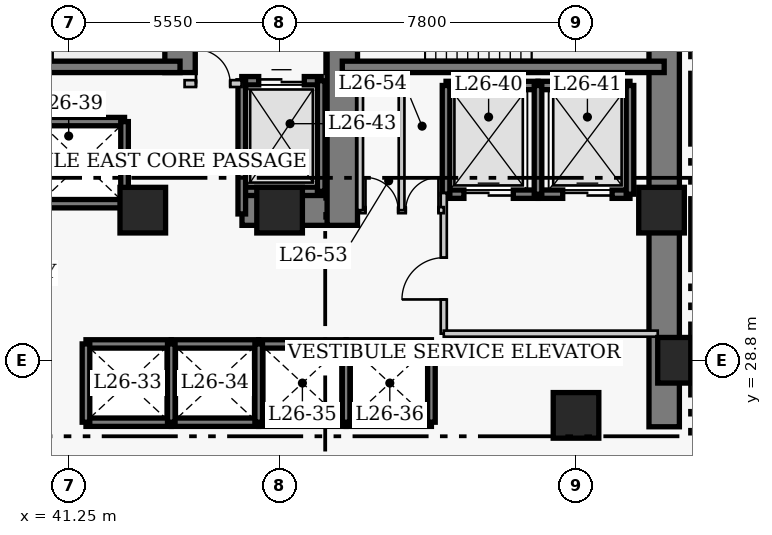
"""IFC4 building model, lengths in metres.
Left out: names, types, materials, properties, quantities, classifications, styles, units other than length and angle.
Written with IfcOpenShell. Run it as: python <this file> out.ifc"""

import sys

from ifc_helpers import new_model, si_unit, direction, frame, frame_2d, origin, origin_2d, place, context, subcontext, project, spatial, rectangle, extrude, element, fill, save


model = new_model("IFC4")
c1 = context("Model", 3, precision=1e-05, world=origin(), true_north=direction((0.0, 1.0)))
c2 = subcontext(c1, "Body", "Model", "MODEL_VIEW")
j1 = project(units=[si_unit("LENGTHUNIT", "METRE"), si_unit("PLANEANGLEUNIT", "RADIAN")], contexts=[c1])
p1 = place(None, origin())
s1 = spatial("IfcSite", under=j1, at=p1, CompositionType="ELEMENT")
p2 = place(p1, origin())
s2 = spatial("IfcBuilding", under=s1, at=p2, CompositionType="ELEMENT")
p3 = place(p2, frame((0.0, 0.0, 107.0)))
s3 = spatial("IfcBuildingStorey", under=s2, at=p3, CompositionType="ELEMENT", Elevation=107.0)
p4 = place(p3, frame((56.92, 27.05, 0.0), z_axis=(0.0, 0.0, 1.0), x_axis=(0.0, 1.0, 0.0)))
e1 = element("IfcWall", 1, at=p4, inside=s3, PredefinedType="SHEAR", context=c2, shape_type="SweptSolid", body=[
    extrude(rectangle(XDim=13.67, YDim=0.8, at=frame_2d((6.835, 0.0))), origin(), (0.0, 0.0, 1.0), 3.8),
])
p5 = place(p3, frame((45.81, 32.75, 0.0), z_axis=(0.0, 0.0, 1.0), x_axis=(1.0, 0.0, 0.0)))
e2 = element("IfcWall", 2, at=p5, inside=s3, PredefinedType="SHEAR", context=c2, shape_type="SweptSolid", body=[
    extrude(rectangle(XDim=2.64, YDim=0.8, at=frame_2d((1.32, 0.0))), origin(), (0.0, 0.0, 1.0), 3.8),
])
p6 = place(p3, frame((44.18, 36.37, 0.0), z_axis=(0.0, 0.0, 1.0), x_axis=(0.0, 1.0, 0.0)))
e3 = element("IfcWall", 3, at=p6, inside=s3, PredefinedType="SHEAR", context=c2, shape_type="SweptSolid", body=[
    extrude(rectangle(XDim=3.95, YDim=0.8, at=frame_2d((1.975, 0.0))), origin(), (0.0, 0.0, 1.0), 3.8),
])
p7 = place(p3, frame((48.45, 32.35, 0.0), z_axis=(0.0, 0.0, 1.0), x_axis=(0.0, 1.0, 0.0)))
e4 = element("IfcWall", 4, at=p7, inside=s3, PredefinedType="SHEAR", context=c2, shape_type="SweptSolid", body=[
    extrude(rectangle(XDim=7.97, YDim=0.8, at=frame_2d((3.985, 0.0))), origin(), (0.0, 0.0, 1.0), 3.8),
])
p8 = place(p7, frame((5.85, 0.0, 0.0)))
e5 = element("IfcOpeningElement", 5, at=p8, cuts=e4, PredefinedType="OPENING", context=c2, shape_type="SweptSolid", body=[
    extrude(rectangle(XDim=1.1, YDim=2.15, at=frame_2d((0.55, 1.075))), frame((0.0, 0.41, 0.0), z_axis=(0.0, -1.0, 0.0), x_axis=(1.0, 0.0, 0.0)), (0.0, 0.0, 1.0), 0.82),
])
p9 = place(p3, frame((35.85, 36.52, 0.0), z_axis=(0.0, 0.0, 1.0), x_axis=(1.0, 0.0, 0.0)))
e6 = element("IfcWall", 6, at=p9, inside=s3, PredefinedType="SHEAR", context=c2, shape_type="SweptSolid", body=[
    extrude(rectangle(XDim=8.33, YDim=0.3, at=frame_2d((4.165, 0.0))), origin(), (0.0, 0.0, 1.0), 3.8),
])
p10 = place(p3, frame((48.45, 36.52, 0.0), z_axis=(0.0, 0.0, 1.0), x_axis=(1.0, 0.0, 0.0)))
e7 = element("IfcWall", 7, at=p10, inside=s3, PredefinedType="SHEAR", context=c2, shape_type="SweptSolid", body=[
    extrude(rectangle(XDim=8.47, YDim=0.3, at=frame_2d((4.235, 0.0))), origin(), (0.0, 0.0, 1.0), 3.8),
])
for number, where, z_axis, x_axis in (
    (8, (57.35, 28.8, 0.0), (0.0, 0.0, 1.0), (1.0, 0.0, 0.0)),
    (9, (43.2, 32.75, 0.0), (0.0, 0.0, 1.0), (1.0, 0.0, 0.0)),
    (10, (46.8, 32.75, 0.0), (0.0, 0.0, 1.0), (1.0, 0.0, 0.0)),
    (11, (54.6, 27.35, 0.0), (0.0, 0.0, 1.0), (1.0, 0.0, 0.0)),
    (12, (56.85, 32.75, 0.0), (0.0, 0.0, 1.0), (1.0, 0.0, 0.0)),
):
    element("IfcColumn", number, at=place(p3, frame(where, z_axis=z_axis, x_axis=x_axis)), inside=s3, PredefinedType="COLUMN", context=c2, shape_type="SweptSolid", body=[
        extrude(rectangle(XDim=1.2, YDim=1.2, at=origin_2d()), origin(), (0.0, 0.0, 1.0), 3.8),
    ])
for number, where, z_axis, x_axis in (
    (13, (41.705, 29.23, 0.0), (0.0, 0.0, 1.0), (1.0, 0.0, 0.0)),
    (14, (41.705, 27.17, 0.0), (0.0, 0.0, 1.0), (1.0, 0.0, 0.0)),
):
    element("IfcWall", number, at=place(p3, frame(where, z_axis=z_axis, x_axis=x_axis)), inside=s3, PredefinedType="SHEAR", context=c2, shape_type="SweptSolid", body=[
        extrude(rectangle(XDim=2.245, YDim=0.22, at=frame_2d((1.123, 0.0))), origin(), (0.0, 0.0, 1.0), 3.8),
    ])
p11 = place(p3, frame((41.705, 27.17, 0.0), z_axis=(0.0, 0.0, 1.0), x_axis=(0.0, 1.0, 0.0)))
e15 = element("IfcWall", 15, at=p11, inside=s3, PredefinedType="SHEAR", context=c2, shape_type="SweptSolid", body=[
    extrude(rectangle(XDim=2.06, YDim=0.2, at=frame_2d((1.03, 0.0))), origin(), (0.0, 0.0, 1.0), 3.8),
])
for number, where, z_axis, x_axis in (
    (16, (43.95, 29.23, 0.0), (0.0, 0.0, 1.0), (1.0, 0.0, 0.0)),
    (17, (43.95, 27.17, 0.0), (0.0, 0.0, 1.0), (1.0, 0.0, 0.0)),
):
    element("IfcWall", number, at=place(p3, frame(where, z_axis=z_axis, x_axis=x_axis)), inside=s3, PredefinedType="SHEAR", context=c2, shape_type="SweptSolid", body=[
        extrude(rectangle(XDim=2.3, YDim=0.22, at=frame_2d((1.15, 0.0))), origin(), (0.0, 0.0, 1.0), 3.8),
    ])
p12 = place(p3, frame((43.95, 27.17, 0.0), z_axis=(0.0, 0.0, 1.0), x_axis=(0.0, 1.0, 0.0)))
e18 = element("IfcWall", 18, at=p12, inside=s3, PredefinedType="SHEAR", context=c2, shape_type="SweptSolid", body=[
    extrude(rectangle(XDim=2.06, YDim=0.2, at=frame_2d((1.03, 0.0))), origin(), (0.0, 0.0, 1.0), 3.8),
])
for number, where, z_axis, x_axis in (
    (19, (46.25, 29.23, 0.0), (0.0, 0.0, 1.0), (1.0, 0.0, 0.0)),
    (20, (46.25, 27.17, 0.0), (0.0, 0.0, 1.0), (1.0, 0.0, 0.0)),
):
    element("IfcWall", number, at=place(p3, frame(where, z_axis=z_axis, x_axis=x_axis)), inside=s3, PredefinedType="SHEAR", context=c2, shape_type="SweptSolid", body=[
        extrude(rectangle(XDim=2.3, YDim=0.22, at=frame_2d((1.15, 0.0))), origin(), (0.0, 0.0, 1.0), 3.8),
    ])
p13 = place(p3, frame((46.25, 27.17, 0.0), z_axis=(0.0, 0.0, 1.0), x_axis=(0.0, 1.0, 0.0)))
e21 = element("IfcWall", 21, at=p13, inside=s3, PredefinedType="SHEAR", context=c2, shape_type="SweptSolid", body=[
    extrude(rectangle(XDim=2.06, YDim=0.2, at=frame_2d((1.03, 0.0))), origin(), (0.0, 0.0, 1.0), 3.8),
])
for number, where, z_axis, x_axis in (
    (22, (48.55, 29.23, 0.0), (0.0, 0.0, 1.0), (1.0, 0.0, 0.0)),
    (23, (48.55, 27.17, 0.0), (0.0, 0.0, 1.0), (1.0, 0.0, 0.0)),
):
    element("IfcWall", number, at=place(p3, frame(where, z_axis=z_axis, x_axis=x_axis)), inside=s3, PredefinedType="SHEAR", context=c2, shape_type="SweptSolid", body=[
        extrude(rectangle(XDim=2.245, YDim=0.22, at=frame_2d((1.123, 0.0))), origin(), (0.0, 0.0, 1.0), 3.8),
    ])
for number, where, z_axis, x_axis in (
    (24, (48.55, 27.17, 0.0), (0.0, 0.0, 1.0), (0.0, 1.0, 0.0)),
    (25, (50.795, 27.17, 0.0), (0.0, 0.0, 1.0), (0.0, 1.0, 0.0)),
):
    element("IfcWall", number, at=place(p3, frame(where, z_axis=z_axis, x_axis=x_axis)), inside=s3, PredefinedType="SHEAR", context=c2, shape_type="SweptSolid", body=[
        extrude(rectangle(XDim=2.06, YDim=0.2, at=frame_2d((1.03, 0.0))), origin(), (0.0, 0.0, 1.0), 3.8),
    ])
for number, where, z_axis, x_axis in (
    (26, (40.4, 35.08, 0.0), (0.0, 0.0, 1.0), (1.0, 0.0, 0.0)),
    (27, (40.4, 32.92, 0.0), (0.0, 0.0, 1.0), (1.0, 0.0, 0.0)),
):
    element("IfcWall", number, at=place(p3, frame(where, z_axis=z_axis, x_axis=x_axis)), inside=s3, PredefinedType="SHEAR", context=c2, shape_type="SweptSolid", body=[
        extrude(rectangle(XDim=2.32, YDim=0.22, at=frame_2d((1.16, 0.0))), origin(), (0.0, 0.0, 1.0), 3.8),
    ])
p14 = place(p3, frame((42.72, 32.92, 0.0), z_axis=(0.0, 0.0, 1.0), x_axis=(0.0, 1.0, 0.0)))
e28 = element("IfcWall", 28, at=p14, inside=s3, PredefinedType="SHEAR", context=c2, shape_type="SweptSolid", body=[
    extrude(rectangle(XDim=2.16, YDim=0.2, at=frame_2d((1.08, 0.0))), origin(), (0.0, 0.0, 1.0), 3.8),
])
p15 = place(p3, frame((51.18, 36.03, 0.0), z_axis=(0.0, 0.0, 1.0), x_axis=(1.0, 0.0, 0.0)))
e29 = element("IfcWall", 29, at=p15, inside=s3, PredefinedType="SHEAR", context=c2, shape_type="SweptSolid", body=[
    extrude(rectangle(XDim=2.42, YDim=0.22, at=frame_2d((1.21, 0.0))), origin(), (0.0, 0.0, 1.0), 3.8),
])
p16 = place(p3, frame((51.18, 33.17, 0.0), z_axis=(0.0, 0.0, 1.0), x_axis=(1.0, 0.0, 0.0)))
e30 = element("IfcWall", 30, at=p16, inside=s3, PredefinedType="SHEAR", context=c2, shape_type="SweptSolid", body=[
    extrude(rectangle(XDim=2.42, YDim=0.22, at=frame_2d((1.21, 0.0))), origin(), (0.0, 0.0, 1.0), 3.8),
])
p17 = place(p16, frame((0.47, 0.0, 0.0)))
e31 = element("IfcOpeningElement", 31, at=p17, cuts=e30, PredefinedType="OPENING", context=c2, shape_type="SweptSolid", body=[
    extrude(rectangle(XDim=1.3, YDim=2.15, at=frame_2d((0.65, 1.075))), frame((0.0, 0.12, 0.0), z_axis=(0.0, -1.0, 0.0), x_axis=(1.0, 0.0, 0.0)), (0.0, 0.0, 1.0), 0.24),
])
p18 = place(p3, frame((51.18, 33.17, 0.0), z_axis=(0.0, 0.0, 1.0), x_axis=(0.0, 1.0, 0.0)))
e32 = element("IfcWall", 32, at=p18, inside=s3, PredefinedType="SHEAR", context=c2, shape_type="SweptSolid", body=[
    extrude(rectangle(XDim=2.86, YDim=0.2, at=frame_2d((1.43, 0.0))), origin(), (0.0, 0.0, 1.0), 3.8),
])
p19 = place(p3, frame((53.6, 36.03, 0.0), z_axis=(0.0, 0.0, 1.0), x_axis=(1.0, 0.0, 0.0)))
e33 = element("IfcWall", 33, at=p19, inside=s3, PredefinedType="SHEAR", context=c2, shape_type="SweptSolid", body=[
    extrude(rectangle(XDim=2.42, YDim=0.22, at=frame_2d((1.21, 0.0))), origin(), (0.0, 0.0, 1.0), 3.8),
])
p20 = place(p3, frame((53.6, 33.17, 0.0), z_axis=(0.0, 0.0, 1.0), x_axis=(1.0, 0.0, 0.0)))
e34 = element("IfcWall", 34, at=p20, inside=s3, PredefinedType="SHEAR", context=c2, shape_type="SweptSolid", body=[
    extrude(rectangle(XDim=2.42, YDim=0.22, at=frame_2d((1.21, 0.0))), origin(), (0.0, 0.0, 1.0), 3.8),
])
p21 = place(p20, frame((0.65, 0.0, 0.0)))
e35 = element("IfcOpeningElement", 35, at=p21, cuts=e34, PredefinedType="OPENING", context=c2, shape_type="SweptSolid", body=[
    extrude(rectangle(XDim=1.3, YDim=2.15, at=frame_2d((0.65, 1.075))), frame((0.0, 0.12, 0.0), z_axis=(0.0, -1.0, 0.0), x_axis=(1.0, 0.0, 0.0)), (0.0, 0.0, 1.0), 0.24),
])
for number, where, z_axis, x_axis in (
    (36, (53.6, 33.17, 0.0), (0.0, 0.0, 1.0), (0.0, 1.0, 0.0)),
    (37, (56.02, 33.17, 0.0), (0.0, 0.0, 1.0), (0.0, 1.0, 0.0)),
):
    element("IfcWall", number, at=place(p3, frame(where, z_axis=z_axis, x_axis=x_axis)), inside=s3, PredefinedType="SHEAR", context=c2, shape_type="SweptSolid", body=[
        extrude(rectangle(XDim=2.86, YDim=0.2, at=frame_2d((1.43, 0.0))), origin(), (0.0, 0.0, 1.0), 3.8),
    ])
p22 = place(p3, frame((45.805, 36.155, 0.0), z_axis=(0.0, 0.0, 1.0), x_axis=(1.0, 0.0, 0.0)))
e38 = element("IfcWall", 38, at=p22, inside=s3, PredefinedType="SHEAR", context=c2, shape_type="SweptSolid", body=[
    extrude(rectangle(XDim=2.09, YDim=0.22, at=frame_2d((1.045, 0.0))), origin(), (0.0, 0.0, 1.0), 3.8),
])
p23 = place(p22, frame((0.445, 0.0, 0.0)))
e39 = element("IfcOpeningElement", 39, at=p23, cuts=e38, PredefinedType="OPENING", context=c2, shape_type="SweptSolid", body=[
    extrude(rectangle(XDim=1.2, YDim=2.15, at=frame_2d((0.6, 1.075))), frame((0.0, 0.12, 0.0), z_axis=(0.0, -1.0, 0.0), x_axis=(1.0, 0.0, 0.0)), (0.0, 0.0, 1.0), 0.24),
])
p24 = place(p3, frame((45.805, 33.245, 0.0), z_axis=(0.0, 0.0, 1.0), x_axis=(1.0, 0.0, 0.0)))
e40 = element("IfcWall", 40, at=p24, inside=s3, PredefinedType="SHEAR", context=c2, shape_type="SweptSolid", body=[
    extrude(rectangle(XDim=2.09, YDim=0.22, at=frame_2d((1.045, 0.0))), origin(), (0.0, 0.0, 1.0), 3.8),
])
p25 = place(p3, frame((45.805, 32.65, 0.0), z_axis=(0.0, 0.0, 1.0), x_axis=(0.0, 1.0, 0.0)))
e41 = element("IfcWall", 41, at=p25, inside=s3, PredefinedType="SHEAR", context=c2, shape_type="SweptSolid", body=[
    extrude(rectangle(XDim=3.505, YDim=0.2, at=frame_2d((1.752, 0.0))), origin(), (0.0, 0.0, 1.0), 3.8),
])
p26 = place(p3, frame((47.895, 33.245, 0.0), z_axis=(0.0, 0.0, 1.0), x_axis=(0.0, 1.0, 0.0)))
e42 = element("IfcWall", 42, at=p26, inside=s3, PredefinedType="SHEAR", context=c2, shape_type="SweptSolid", body=[
    extrude(rectangle(XDim=2.91, YDim=0.2, at=frame_2d((1.455, 0.0))), origin(), (0.0, 0.0, 1.0), 3.8),
])
p27 = place(p3, frame((44.3, 36.08, 0.0), z_axis=(0.0, 0.0, 1.0), x_axis=(1.0, 0.0, 0.0)))
e43 = element("IfcWall", 43, at=p27, inside=s3, PredefinedType="PARTITIONING", context=c2, shape_type="SweptSolid", body=[
    extrude(rectangle(XDim=1.5, YDim=0.18, at=frame_2d((0.75, 0.0))), origin(), (0.0, 0.0, 1.0), 3.54),
])
p28 = place(p27, frame((0.3, 0.0, 0.0)))
e44 = element("IfcOpeningElement", 44, at=p28, cuts=e43, PredefinedType="OPENING", context=c2, shape_type="SweptSolid", body=[
    extrude(rectangle(XDim=0.9, YDim=2.15, at=frame_2d((0.45, 1.075))), frame((0.0, 0.1, 0.0), z_axis=(0.0, -1.0, 0.0), x_axis=(1.0, 0.0, 0.0)), (0.0, 0.0, 1.0), 0.2),
])
p29 = place(p3, frame((51.12, 29.5, 0.0), z_axis=(0.0, 0.0, 1.0), x_axis=(0.0, 1.0, 0.0)))
e45 = element("IfcWall", 45, at=p29, inside=s3, PredefinedType="PARTITIONING", context=c2, shape_type="SweptSolid", body=[
    extrude(rectangle(XDim=3.7, YDim=0.16, at=frame_2d((1.85, 0.0))), origin(), (0.0, 0.0, 1.0), 3.54),
])
p30 = place(p29, frame((0.9, 0.0, 0.0)))
e46 = element("IfcOpeningElement", 46, at=p30, cuts=e45, PredefinedType="OPENING", context=c2, shape_type="SweptSolid", body=[
    extrude(rectangle(XDim=1.1, YDim=2.15, at=frame_2d((0.55, 1.075))), frame((0.0, 0.09, 0.0), z_axis=(0.0, -1.0, 0.0), x_axis=(1.0, 0.0, 0.0)), (0.0, 0.0, 1.0), 0.18),
])
p31 = place(p3, frame((51.12, 29.5, 0.0), z_axis=(0.0, 0.0, 1.0), x_axis=(1.0, 0.0, 0.0)))
e47 = element("IfcWall", 47, at=p31, inside=s3, PredefinedType="PARTITIONING", context=c2, shape_type="SweptSolid", body=[
    extrude(rectangle(XDim=5.63, YDim=0.16, at=frame_2d((2.815, 0.0))), origin(), (0.0, 0.0, 1.0), 3.54),
])
p32 = place(p3, frame((48.92, 32.75, 0.0), z_axis=(0.0, 0.0, 1.0), x_axis=(1.0, 0.0, 0.0)))
e48 = element("IfcWall", 48, at=p32, inside=s3, PredefinedType="PARTITIONING", context=c2, shape_type="SweptSolid", body=[
    extrude(rectangle(XDim=2.2, YDim=0.16, at=frame_2d((1.1, 0.0))), origin(), (0.0, 0.0, 1.0), 3.54),
])
p33 = place(p32, frame((0.14, 0.0, 0.0)))
e49 = element("IfcOpeningElement", 49, at=p33, cuts=e48, PredefinedType="OPENING", context=c2, shape_type="SweptSolid", body=[
    extrude(rectangle(XDim=0.86, YDim=2.05, at=frame_2d((0.43, 1.025))), frame((0.0, 0.09, 0.0), z_axis=(0.0, -1.0, 0.0), x_axis=(1.0, 0.0, 0.0)), (0.0, 0.0, 1.0), 0.18),
])
p34 = place(p32, frame((1.2, 0.0, 0.0)))
e50 = element("IfcOpeningElement", 50, at=p34, cuts=e48, PredefinedType="OPENING", context=c2, shape_type="SweptSolid", body=[
    extrude(rectangle(XDim=0.86, YDim=2.05, at=frame_2d((0.43, 1.025))), frame((0.0, 0.09, 0.0), z_axis=(0.0, -1.0, 0.0), x_axis=(1.0, 0.0, 0.0)), (0.0, 0.0, 1.0), 0.18),
])
for number, where, z_axis, x_axis in (
    (51, (48.92, 32.75, 0.0), (0.0, 0.0, 1.0), (0.0, 1.0, 0.0)),
    (52, (50.01, 32.75, 0.0), (0.0, 0.0, 1.0), (0.0, 1.0, 0.0)),
):
    element("IfcWall", number, at=place(p3, frame(where, z_axis=z_axis, x_axis=x_axis)), inside=s3, PredefinedType="PARTITIONING", context=c2, shape_type="SweptSolid", body=[
        extrude(rectangle(XDim=3.62, YDim=0.15, at=frame_2d((1.81, 0.0))), origin(), (0.0, 0.0, 1.0), 3.54),
    ])
p35 = place(p17, origin())
e53 = element("IfcDoor", 53, at=p35, inside=s3, OperationType="DOUBLE_DOOR_SLIDING", PredefinedType="DOOR", context=c2, shape_type="SweptSolid", body=[
    extrude(rectangle(XDim=1.3, YDim=2.15, at=frame_2d((0.65, 1.075))), frame((0.0, 0.025, 0.0), z_axis=(0.0, -1.0, 0.0), x_axis=(1.0, 0.0, 0.0)), (0.0, 0.0, 1.0), 0.05),
])
fill(e31, e53)
p36 = place(p21, origin())
e54 = element("IfcDoor", 54, at=p36, inside=s3, OperationType="DOUBLE_DOOR_SLIDING", PredefinedType="DOOR", context=c2, shape_type="SweptSolid", body=[
    extrude(rectangle(XDim=1.3, YDim=2.15, at=frame_2d((0.65, 1.075))), frame((0.0, 0.025, 0.0), z_axis=(0.0, -1.0, 0.0), x_axis=(1.0, 0.0, 0.0)), (0.0, 0.0, 1.0), 0.05),
])
fill(e35, e54)
p37 = place(p23, origin())
e55 = element("IfcDoor", 55, at=p37, inside=s3, OperationType="DOUBLE_DOOR_SLIDING", PredefinedType="DOOR", context=c2, shape_type="SweptSolid", body=[
    extrude(rectangle(XDim=1.2, YDim=2.15, at=frame_2d((0.6, 1.075))), frame((0.0, 0.025, 0.0), z_axis=(0.0, -1.0, 0.0), x_axis=(1.0, 0.0, 0.0)), (0.0, 0.0, 1.0), 0.05),
])
fill(e39, e55)
p38 = place(p28, origin())
e56 = element("IfcDoor", 56, at=p38, inside=s3, OperationType="SINGLE_SWING_LEFT", PredefinedType="DOOR", context=c2, shape_type="SweptSolid", body=[
    extrude(rectangle(XDim=0.9, YDim=2.15, at=frame_2d((0.45, 1.075))), frame((0.0, 0.025, 0.0), z_axis=(0.0, -1.0, 0.0), x_axis=(1.0, 0.0, 0.0)), (0.0, 0.0, 1.0), 0.05),
])
fill(e44, e56)
p39 = place(p30, origin())
e57 = element("IfcDoor", 57, at=p39, inside=s3, OperationType="SINGLE_SWING_LEFT", PredefinedType="DOOR", context=c2, shape_type="SweptSolid", body=[
    extrude(rectangle(XDim=1.1, YDim=2.15, at=frame_2d((0.55, 1.075))), frame((0.0, 0.025, 0.0), z_axis=(0.0, -1.0, 0.0), x_axis=(1.0, 0.0, 0.0)), (0.0, 0.0, 1.0), 0.05),
])
fill(e46, e57)
p40 = place(p33, origin())
e58 = element("IfcDoor", 58, at=p40, inside=s3, OperationType="SINGLE_SWING_LEFT", PredefinedType="DOOR", context=c2, shape_type="SweptSolid", body=[
    extrude(rectangle(XDim=0.86, YDim=2.05, at=frame_2d((0.43, 1.025))), frame((0.0, 0.025, 0.0), z_axis=(0.0, -1.0, 0.0), x_axis=(1.0, 0.0, 0.0)), (0.0, 0.0, 1.0), 0.05),
])
fill(e49, e58)
p41 = place(p34, origin())
e59 = element("IfcDoor", 59, at=p41, inside=s3, OperationType="SINGLE_SWING_RIGHT", PredefinedType="DOOR", context=c2, shape_type="SweptSolid", body=[
    extrude(rectangle(XDim=0.86, YDim=2.05, at=frame_2d((0.43, 1.025))), frame((0.0, 0.025, 0.0), z_axis=(0.0, -1.0, 0.0), x_axis=(1.0, 0.0, 0.0)), (0.0, 0.0, 1.0), 0.05),
])
fill(e50, e59)
save(model, sys.argv[1])
